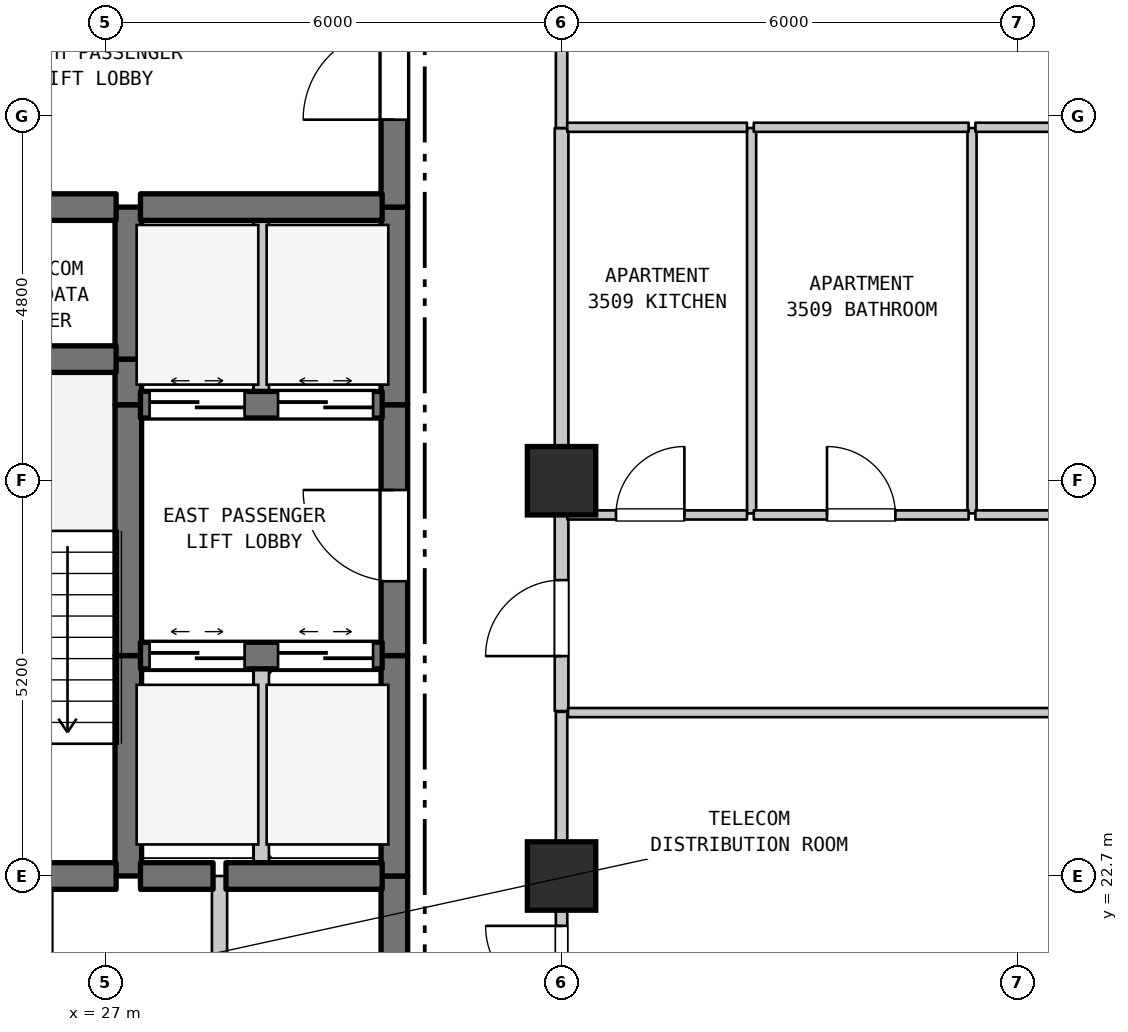
"""IFC4 building model, lengths in metres.
Left out: names, types, materials, properties, quantities, classifications, styles, units other than length and angle.
Written with IfcOpenShell. Run it as: python <this file> out.ifc"""

import sys

from ifc_helpers import new_model, si_unit, direction, frame, frame_2d, origin, origin_2d, place, context, subcontext, project, spatial, rectangle, extrude, element, fill, save


model = new_model("IFC4")
c1 = context("Model", 3, precision=1e-05, world=origin(), true_north=direction((0.0, 1.0)))
c2 = subcontext(c1, "Body", "Model", "MODEL_VIEW")
j1 = project(units=[si_unit("LENGTHUNIT", "METRE"), si_unit("PLANEANGLEUNIT", "RADIAN")], contexts=[c1])
p1 = place(None, origin())
s1 = spatial("IfcSite", under=j1, at=p1, CompositionType="ELEMENT")
p2 = place(p1, origin())
s2 = spatial("IfcBuilding", under=s1, at=p2, CompositionType="ELEMENT")
p3 = place(p2, frame((0.0, 0.0, 144.6)))
s3 = spatial("IfcBuildingStorey", under=s2, at=p3, CompositionType="ELEMENT", Elevation=144.6)
for number, where, z_axis, x_axis in (
    (1, (33.0, 22.7, 0.0), (0.0, 0.0, 1.0), (1.0, 0.0, 0.0)),
    (2, (33.0, 27.9, 0.0), (0.0, 0.0, 1.0), (1.0, 0.0, 0.0)),
):
    element("IfcColumn", number, at=place(p3, frame(where, z_axis=z_axis, x_axis=x_axis)), inside=s3, PredefinedType="COLUMN", context=c2, shape_type="SweptSolid", body=[
        extrude(rectangle(XDim=0.9, YDim=0.9, at=origin_2d()), origin(), (0.0, 0.0, 1.0), 3.7),
    ])
p4 = place(p3, frame((27.3, 22.7, 0.0), z_axis=(0.0, 0.0, 1.0), x_axis=(0.0, 1.0, 0.0)))
e3 = element("IfcWall", 3, at=p4, inside=s3, PredefinedType="SHEAR", context=c2, shape_type="SweptSolid", body=[
    extrude(rectangle(XDim=2.9, YDim=0.35, at=frame_2d((1.45, 0.0))), origin(), (0.0, 0.0, 1.0), 3.385),
])
p5 = place(p3, frame((27.3, 25.6, 0.0), z_axis=(0.0, 0.0, 1.0), x_axis=(0.0, 1.0, 0.0)))
e4 = element("IfcWall", 4, at=p5, inside=s3, PredefinedType="SHEAR", context=c2, shape_type="SweptSolid", body=[
    extrude(rectangle(XDim=3.3, YDim=0.35, at=frame_2d((1.65, 0.0))), origin(), (0.0, 0.0, 1.0), 3.385),
])
p6 = place(p3, frame((27.3, 28.9, 0.0), z_axis=(0.0, 0.0, 1.0), x_axis=(0.0, 1.0, 0.0)))
e5 = element("IfcWall", 5, at=p6, inside=s3, PredefinedType="SHEAR", context=c2, shape_type="SweptSolid", body=[
    extrude(rectangle(XDim=0.6, YDim=0.35, at=frame_2d((0.3, 0.0))), origin(), (0.0, 0.0, 1.0), 3.385),
])
p7 = place(p3, frame((27.3, 29.5, 0.0), z_axis=(0.0, 0.0, 1.0), x_axis=(0.0, 1.0, 0.0)))
e6 = element("IfcWall", 6, at=p7, inside=s3, PredefinedType="SHEAR", context=c2, shape_type="SweptSolid", body=[
    extrude(rectangle(XDim=2.0, YDim=0.35, at=frame_2d((1.0, 0.0))), origin(), (0.0, 0.0, 1.0), 3.385),
])
p8 = place(p3, frame((28.5, 19.5, 0.0), z_axis=(0.0, 0.0, 1.0), x_axis=(0.0, 1.0, 0.0)))
e7 = element("IfcWall", 7, at=p8, inside=s3, PredefinedType="STANDARD", context=c2, shape_type="SweptSolid", body=[
    extrude(rectangle(XDim=3.2, YDim=0.2, at=frame_2d((1.6, 0.0))), origin(), (0.0, 0.0, 1.0), 3.385),
])
p9 = place(p3, frame((29.05, 22.7, 0.0), z_axis=(0.0, 0.0, 1.0), x_axis=(0.0, 1.0, 0.0)))
e8 = element("IfcWall", 8, at=p9, inside=s3, PredefinedType="STANDARD", context=c2, shape_type="SweptSolid", body=[
    extrude(rectangle(XDim=2.9, YDim=0.2, at=frame_2d((1.45, 0.0))), origin(), (0.0, 0.0, 1.0), 3.385),
])
p10 = place(p3, frame((29.05, 28.9, 0.0), z_axis=(0.0, 0.0, 1.0), x_axis=(0.0, 1.0, 0.0)))
e9 = element("IfcWall", 9, at=p10, inside=s3, PredefinedType="STANDARD", context=c2, shape_type="SweptSolid", body=[
    extrude(rectangle(XDim=2.6, YDim=0.2, at=frame_2d((1.3, 0.0))), origin(), (0.0, 0.0, 1.0), 3.385),
])
p11 = place(p3, frame((30.8, 19.5, 0.0), z_axis=(0.0, 0.0, 1.0), x_axis=(0.0, 1.0, 0.0)))
e10 = element("IfcWall", 10, at=p11, inside=s3, PredefinedType="SHEAR", context=c2, shape_type="SweptSolid", body=[
    extrude(rectangle(XDim=3.2, YDim=0.35, at=frame_2d((1.6, 0.0))), origin(), (0.0, 0.0, 1.0), 3.385),
])
p12 = place(p3, frame((30.8, 22.7, 0.0), z_axis=(0.0, 0.0, 1.0), x_axis=(0.0, 1.0, 0.0)))
e11 = element("IfcWall", 11, at=p12, inside=s3, PredefinedType="SHEAR", context=c2, shape_type="SweptSolid", body=[
    extrude(rectangle(XDim=2.9, YDim=0.35, at=frame_2d((1.45, 0.0))), origin(), (0.0, 0.0, 1.0), 3.385),
])
p13 = place(p3, frame((30.8, 25.6, 0.0), z_axis=(0.0, 0.0, 1.0), x_axis=(0.0, 1.0, 0.0)))
e12 = element("IfcWall", 12, at=p13, inside=s3, PredefinedType="SHEAR", context=c2, shape_type="SweptSolid", body=[
    extrude(rectangle(XDim=3.3, YDim=0.35, at=frame_2d((1.65, 0.0))), origin(), (0.0, 0.0, 1.0), 3.385),
])
p14 = place(p13, frame((0.978, 0.0, 0.0)))
e13 = element("IfcOpeningElement", 13, at=p14, cuts=e12, PredefinedType="OPENING", context=c2, shape_type="SweptSolid", body=[
    extrude(rectangle(XDim=1.2, YDim=2.2, at=frame_2d((0.6, 1.1))), frame((0.0, 0.185, 0.0), z_axis=(0.0, -1.0, 0.0), x_axis=(1.0, 0.0, 0.0)), (0.0, 0.0, 1.0), 0.37),
])
p15 = place(p3, frame((30.8, 28.9, 0.0), z_axis=(0.0, 0.0, 1.0), x_axis=(0.0, 1.0, 0.0)))
e14 = element("IfcWall", 14, at=p15, inside=s3, PredefinedType="SHEAR", context=c2, shape_type="SweptSolid", body=[
    extrude(rectangle(XDim=2.6, YDim=0.35, at=frame_2d((1.3, 0.0))), origin(), (0.0, 0.0, 1.0), 3.385),
])
p16 = place(p3, frame((30.8, 31.5, 0.0), z_axis=(0.0, 0.0, 1.0), x_axis=(0.0, 1.0, 0.0)))
e15 = element("IfcWall", 15, at=p16, inside=s3, PredefinedType="SHEAR", context=c2, shape_type="SweptSolid", body=[
    extrude(rectangle(XDim=3.5, YDim=0.35, at=frame_2d((1.75, 0.0))), origin(), (0.0, 0.0, 1.0), 3.385),
])
p17 = place(p16, frame((1.15, 0.0, 0.0)))
e16 = element("IfcOpeningElement", 16, at=p17, cuts=e15, PredefinedType="OPENING", context=c2, shape_type="SweptSolid", body=[
    extrude(rectangle(XDim=1.2, YDim=2.2, at=frame_2d((0.6, 1.1))), frame((0.0, 0.185, 0.0), z_axis=(0.0, -1.0, 0.0), x_axis=(1.0, 0.0, 0.0)), (0.0, 0.0, 1.0), 0.37),
])
p18 = place(p3, frame((33.0, 19.51, 0.0), z_axis=(0.0, 0.0, 1.0), x_axis=(0.0, 1.0, 0.0)))
e17 = element("IfcWall", 17, at=p18, inside=s3, PredefinedType="STANDARD", context=c2, shape_type="SweptSolid", body=[
    extrude(rectangle(XDim=5.35, YDim=0.15, at=frame_2d((2.675, 0.0))), origin(), (0.0, 0.0, 1.0), 2.935),
])
p19 = place(p18, frame((1.534, 0.0, 0.0)))
e18 = element("IfcOpeningElement", 18, at=p19, cuts=e17, PredefinedType="OPENING", context=c2, shape_type="SweptSolid", body=[
    extrude(rectangle(XDim=1.0, YDim=2.15, at=frame_2d((0.5, 1.075))), frame((0.0, 0.085, 0.0), z_axis=(0.0, -1.0, 0.0), x_axis=(1.0, 0.0, 0.0)), (0.0, 0.0, 1.0), 0.17),
])
p20 = place(p3, frame((33.0, 24.87, 0.0), z_axis=(0.0, 0.0, 1.0), x_axis=(0.0, 1.0, 0.0)))
e19 = element("IfcWall", 19, at=p20, inside=s3, PredefinedType="STANDARD", context=c2, shape_type="SweptSolid", body=[
    extrude(rectangle(XDim=2.6, YDim=0.18, at=frame_2d((1.3, 0.0))), origin(), (0.0, 0.0, 1.0), 2.935),
])
p21 = place(p20, frame((0.723, 0.0, 0.0)))
e20 = element("IfcOpeningElement", 20, at=p21, cuts=e19, PredefinedType="OPENING", context=c2, shape_type="SweptSolid", body=[
    extrude(rectangle(XDim=1.0, YDim=2.15, at=frame_2d((0.5, 1.075))), frame((0.0, 0.1, 0.0), z_axis=(0.0, -1.0, 0.0), x_axis=(1.0, 0.0, 0.0)), (0.0, 0.0, 1.0), 0.2),
])
p22 = place(p3, frame((33.0, 27.47, 0.0), z_axis=(0.0, 0.0, 1.0), x_axis=(0.0, 1.0, 0.0)))
e21 = element("IfcWall", 21, at=p22, inside=s3, PredefinedType="STANDARD", context=c2, shape_type="SweptSolid", body=[
    extrude(rectangle(XDim=5.07, YDim=0.18, at=frame_2d((2.535, 0.0))), origin(), (0.0, 0.0, 1.0), 2.885),
])
p23 = place(p3, frame((33.0, 32.54, 0.0), z_axis=(0.0, 0.0, 1.0), x_axis=(0.0, 1.0, 0.0)))
e22 = element("IfcWall", 22, at=p23, inside=s3, PredefinedType="STANDARD", context=c2, shape_type="SweptSolid", body=[
    extrude(rectangle(XDim=5.36, YDim=0.15, at=frame_2d((2.68, 0.0))), origin(), (0.0, 0.0, 1.0), 2.885),
])
p24 = place(p23, frame((2.109, 0.0, 0.0)))
e23 = element("IfcOpeningElement", 23, at=p24, cuts=e22, PredefinedType="OPENING", context=c2, shape_type="SweptSolid", body=[
    extrude(rectangle(XDim=1.0, YDim=2.15, at=frame_2d((0.5, 1.075))), frame((0.0, 0.085, 0.0), z_axis=(0.0, -1.0, 0.0), x_axis=(1.0, 0.0, 0.0)), (0.0, 0.0, 1.0), 0.17),
])
for number, where, z_axis, x_axis in (
    (24, (35.5, 27.47, 0.0), (0.0, 0.0, 1.0), (0.0, 1.0, 0.0)),
    (25, (38.4, 27.47, 0.0), (0.0, 0.0, 1.0), (0.0, 1.0, 0.0)),
):
    element("IfcWall", number, at=place(p3, frame(where, z_axis=z_axis, x_axis=x_axis)), inside=s3, PredefinedType="PARTITIONING", context=c2, shape_type="SweptSolid", body=[
        extrude(rectangle(XDim=5.07, YDim=0.12, at=frame_2d((2.535, 0.0))), origin(), (0.0, 0.0, 1.0), 3.385),
    ])
p25 = place(p3, frame((23.96, 22.7, 0.0), z_axis=(0.0, 0.0, 1.0), x_axis=(1.0, 0.0, 0.0)))
e26 = element("IfcWall", 26, at=p25, inside=s3, PredefinedType="SHEAR", context=c2, shape_type="SweptSolid", body=[
    extrude(rectangle(XDim=3.18, YDim=0.35, at=frame_2d((1.59, 0.0))), origin(), (0.0, 0.0, 1.0), 3.385),
])
p26 = place(p3, frame((27.46, 22.7, 0.0), z_axis=(0.0, 0.0, 1.0), x_axis=(1.0, 0.0, 0.0)))
e27 = element("IfcWall", 27, at=p26, inside=s3, PredefinedType="SHEAR", context=c2, shape_type="SweptSolid", body=[
    extrude(rectangle(XDim=0.955, YDim=0.35, at=frame_2d((0.478, 0.0))), origin(), (0.0, 0.0, 1.0), 3.385),
])
p27 = place(p3, frame((28.585, 22.7, 0.0), z_axis=(0.0, 0.0, 1.0), x_axis=(1.0, 0.0, 0.0)))
e28 = element("IfcWall", 28, at=p27, inside=s3, PredefinedType="SHEAR", context=c2, shape_type="SweptSolid", body=[
    extrude(rectangle(XDim=2.055, YDim=0.35, at=frame_2d((1.027, 0.0))), origin(), (0.0, 0.0, 1.0), 3.385),
])
p28 = place(p3, frame((33.085, 24.85, 0.0), z_axis=(0.0, 0.0, 1.0), x_axis=(1.0, 0.0, 0.0)))
e29 = element("IfcWall", 29, at=p28, inside=s3, PredefinedType="PARTITIONING", context=c2, shape_type="SweptSolid", body=[
    extrude(rectangle(XDim=23.905, YDim=0.12, at=frame_2d((11.953, 0.0))), origin(), (0.0, 0.0, 1.0), 3.385),
])
p29 = place(p3, frame((27.46, 25.6, 0.0), z_axis=(0.0, 0.0, 1.0), x_axis=(1.0, 0.0, 0.0)))
e30 = element("IfcWall", 30, at=p29, inside=s3, PredefinedType="SHEAR", context=c2, shape_type="SweptSolid", body=[
    extrude(rectangle(XDim=3.18, YDim=0.35, at=frame_2d((1.59, 0.0))), origin(), (0.0, 0.0, 1.0), 3.385),
])
p30 = place(p29, frame((0.12, 0.0, 0.0)))
e31 = element("IfcOpeningElement", 31, at=p30, cuts=e30, PredefinedType="OPENING", context=c2, shape_type="SweptSolid", body=[
    extrude(rectangle(XDim=1.25, YDim=2.2, at=frame_2d((0.625, 1.1))), frame((0.0, 0.185, 0.0), z_axis=(0.0, -1.0, 0.0), x_axis=(1.0, 0.0, 0.0)), (0.0, 0.0, 1.0), 0.37),
])
p31 = place(p29, frame((1.81, 0.0, 0.0)))
e32 = element("IfcOpeningElement", 32, at=p31, cuts=e30, PredefinedType="OPENING", context=c2, shape_type="SweptSolid", body=[
    extrude(rectangle(XDim=1.25, YDim=2.2, at=frame_2d((0.625, 1.1))), frame((0.0, 0.185, 0.0), z_axis=(0.0, -1.0, 0.0), x_axis=(1.0, 0.0, 0.0)), (0.0, 0.0, 1.0), 0.37),
])
p32 = place(p3, frame((33.075, 27.45, 0.0), z_axis=(0.0, 0.0, 1.0), x_axis=(1.0, 0.0, 0.0)))
e33 = element("IfcWall", 33, at=p32, inside=s3, PredefinedType="PARTITIONING", context=c2, shape_type="SweptSolid", body=[
    extrude(rectangle(XDim=2.364, YDim=0.12, at=frame_2d((1.182, 0.0))), origin(), (0.0, 0.0, 1.0), 3.385),
])
p33 = place(p32, frame((0.641, 0.0, 0.0)))
e34 = element("IfcOpeningElement", 34, at=p33, cuts=e33, PredefinedType="OPENING", context=c2, shape_type="SweptSolid", body=[
    extrude(rectangle(XDim=0.9, YDim=2.15, at=frame_2d((0.45, 1.075))), frame((0.0, 0.07, 0.0), z_axis=(0.0, -1.0, 0.0), x_axis=(1.0, 0.0, 0.0)), (0.0, 0.0, 1.0), 0.14),
])
p34 = place(p3, frame((35.529, 27.45, 0.0), z_axis=(0.0, 0.0, 1.0), x_axis=(1.0, 0.0, 0.0)))
e35 = element("IfcWall", 35, at=p34, inside=s3, PredefinedType="PARTITIONING", context=c2, shape_type="SweptSolid", body=[
    extrude(rectangle(XDim=2.826, YDim=0.12, at=frame_2d((1.413, 0.0))), origin(), (0.0, 0.0, 1.0), 3.385),
])
p35 = place(p34, frame((0.963, 0.0, 0.0)))
e36 = element("IfcOpeningElement", 36, at=p35, cuts=e35, PredefinedType="OPENING", context=c2, shape_type="SweptSolid", body=[
    extrude(rectangle(XDim=0.9, YDim=2.1, at=frame_2d((0.45, 1.05))), frame((0.0, 0.07, 0.0), z_axis=(0.0, -1.0, 0.0), x_axis=(1.0, 0.0, 0.0)), (0.0, 0.0, 1.0), 0.14),
])
p36 = place(p3, frame((38.445, 27.45, 0.0), z_axis=(0.0, 0.0, 1.0), x_axis=(1.0, 0.0, 0.0)))
e37 = element("IfcWall", 37, at=p36, inside=s3, PredefinedType="PARTITIONING", context=c2, shape_type="SweptSolid", body=[
    extrude(rectangle(XDim=18.545, YDim=0.12, at=frame_2d((9.272, 0.0))), origin(), (0.0, 0.0, 1.0), 3.385),
])
p37 = place(p36, frame((3.042, 0.0, 0.0)))
e38 = element("IfcOpeningElement", 38, at=p37, cuts=e37, PredefinedType="OPENING", context=c2, shape_type="SweptSolid", body=[
    extrude(rectangle(XDim=0.9, YDim=2.15, at=frame_2d((0.45, 1.075))), frame((0.0, 0.07, 0.0), z_axis=(0.0, -1.0, 0.0), x_axis=(1.0, 0.0, 0.0)), (0.0, 0.0, 1.0), 0.14),
])
p38 = place(p36, frame((10.103, 0.0, 0.0)))
e39 = element("IfcOpeningElement", 39, at=p38, cuts=e37, PredefinedType="OPENING", context=c2, shape_type="SweptSolid", body=[
    extrude(rectangle(XDim=0.9, YDim=2.15, at=frame_2d((0.45, 1.075))), frame((0.0, 0.07, 0.0), z_axis=(0.0, -1.0, 0.0), x_axis=(1.0, 0.0, 0.0)), (0.0, 0.0, 1.0), 0.14),
])
p39 = place(p36, frame((15.791, 0.0, 0.0)))
e40 = element("IfcOpeningElement", 40, at=p39, cuts=e37, PredefinedType="OPENING", context=c2, shape_type="SweptSolid", body=[
    extrude(rectangle(XDim=0.9, YDim=2.15, at=frame_2d((0.45, 1.075))), frame((0.0, 0.07, 0.0), z_axis=(0.0, -1.0, 0.0), x_axis=(1.0, 0.0, 0.0)), (0.0, 0.0, 1.0), 0.14),
])
p40 = place(p3, frame((27.46, 28.9, 0.0), z_axis=(0.0, 0.0, 1.0), x_axis=(1.0, 0.0, 0.0)))
e41 = element("IfcWall", 41, at=p40, inside=s3, PredefinedType="SHEAR", context=c2, shape_type="SweptSolid", body=[
    extrude(rectangle(XDim=3.18, YDim=0.35, at=frame_2d((1.59, 0.0))), origin(), (0.0, 0.0, 1.0), 3.385),
])
p41 = place(p40, frame((0.12, 0.0, 0.0)))
e42 = element("IfcOpeningElement", 42, at=p41, cuts=e41, PredefinedType="OPENING", context=c2, shape_type="SweptSolid", body=[
    extrude(rectangle(XDim=1.25, YDim=2.2, at=frame_2d((0.625, 1.1))), frame((0.0, 0.185, 0.0), z_axis=(0.0, -1.0, 0.0), x_axis=(1.0, 0.0, 0.0)), (0.0, 0.0, 1.0), 0.37),
])
p42 = place(p40, frame((1.81, 0.0, 0.0)))
e43 = element("IfcOpeningElement", 43, at=p42, cuts=e41, PredefinedType="OPENING", context=c2, shape_type="SweptSolid", body=[
    extrude(rectangle(XDim=1.25, YDim=2.2, at=frame_2d((0.625, 1.1))), frame((0.0, 0.185, 0.0), z_axis=(0.0, -1.0, 0.0), x_axis=(1.0, 0.0, 0.0)), (0.0, 0.0, 1.0), 0.37),
])
p43 = place(p3, frame((23.96, 29.5, 0.0), z_axis=(0.0, 0.0, 1.0), x_axis=(1.0, 0.0, 0.0)))
e44 = element("IfcWall", 44, at=p43, inside=s3, PredefinedType="SHEAR", context=c2, shape_type="SweptSolid", body=[
    extrude(rectangle(XDim=3.18, YDim=0.35, at=frame_2d((1.59, 0.0))), origin(), (0.0, 0.0, 1.0), 3.385),
])
p44 = place(p3, frame((23.96, 31.5, 0.0), z_axis=(0.0, 0.0, 1.0), x_axis=(1.0, 0.0, 0.0)))
e45 = element("IfcWall", 45, at=p44, inside=s3, PredefinedType="SHEAR", context=c2, shape_type="SweptSolid", body=[
    extrude(rectangle(XDim=3.18, YDim=0.35, at=frame_2d((1.59, 0.0))), origin(), (0.0, 0.0, 1.0), 3.385),
])
p45 = place(p44, frame((1.094, 0.0, 0.0)))
e46 = element("IfcOpeningElement", 46, at=p45, cuts=e45, PredefinedType="OPENING", context=c2, shape_type="SweptSolid", body=[
    extrude(rectangle(XDim=0.85, YDim=2.1, at=frame_2d((0.425, 1.05))), frame((0.0, 0.185, 0.0), z_axis=(0.0, -1.0, 0.0), x_axis=(1.0, 0.0, 0.0)), (0.0, 0.0, 1.0), 0.37),
])
p46 = place(p3, frame((27.46, 31.5, 0.0), z_axis=(0.0, 0.0, 1.0), x_axis=(1.0, 0.0, 0.0)))
e47 = element("IfcWall", 47, at=p46, inside=s3, PredefinedType="SHEAR", context=c2, shape_type="SweptSolid", body=[
    extrude(rectangle(XDim=3.18, YDim=0.35, at=frame_2d((1.59, 0.0))), origin(), (0.0, 0.0, 1.0), 3.385),
])
p47 = place(p3, frame((33.075, 32.55, 0.0), z_axis=(0.0, 0.0, 1.0), x_axis=(1.0, 0.0, 0.0)))
e48 = element("IfcWall", 48, at=p47, inside=s3, PredefinedType="PARTITIONING", context=c2, shape_type="SweptSolid", body=[
    extrude(rectangle(XDim=2.364, YDim=0.12, at=frame_2d((1.182, 0.0))), origin(), (0.0, 0.0, 1.0), 3.385),
])
p48 = place(p3, frame((35.529, 32.55, 0.0), z_axis=(0.0, 0.0, 1.0), x_axis=(1.0, 0.0, 0.0)))
e49 = element("IfcWall", 49, at=p48, inside=s3, PredefinedType="PARTITIONING", context=c2, shape_type="SweptSolid", body=[
    extrude(rectangle(XDim=2.826, YDim=0.12, at=frame_2d((1.413, 0.0))), origin(), (0.0, 0.0, 1.0), 3.385),
])
p49 = place(p3, frame((38.445, 32.55, 0.0), z_axis=(0.0, 0.0, 1.0), x_axis=(1.0, 0.0, 0.0)))
e50 = element("IfcWall", 50, at=p49, inside=s3, PredefinedType="PARTITIONING", context=c2, shape_type="SweptSolid", body=[
    extrude(rectangle(XDim=21.335, YDim=0.12, at=frame_2d((10.667, 0.0))), origin(), (0.0, 0.0, 1.0), 3.385),
])
p50 = place(p14, origin())
e51 = element("IfcDoor", 51, at=p50, inside=s3, OperationType="SINGLE_SWING_RIGHT", PredefinedType="DOOR", context=c2, shape_type="SweptSolid", body=[
    extrude(rectangle(XDim=1.2, YDim=2.2, at=frame_2d((0.6, 1.1))), frame((0.0, 0.025, 0.0), z_axis=(0.0, -1.0, 0.0), x_axis=(1.0, 0.0, 0.0)), (0.0, 0.0, 1.0), 0.05),
])
fill(e13, e51)
p51 = place(p17, origin())
e52 = element("IfcDoor", 52, at=p51, inside=s3, OperationType="SINGLE_SWING_LEFT", PredefinedType="DOOR", context=c2, shape_type="SweptSolid", body=[
    extrude(rectangle(XDim=1.2, YDim=2.2, at=frame_2d((0.6, 1.1))), frame((0.0, 0.025, 0.0), z_axis=(0.0, -1.0, 0.0), x_axis=(1.0, 0.0, 0.0)), (0.0, 0.0, 1.0), 0.05),
])
fill(e16, e52)
p52 = place(p19, origin())
e53 = element("IfcDoor", 53, at=p52, inside=s3, OperationType="SINGLE_SWING_RIGHT", PredefinedType="DOOR", context=c2, shape_type="SweptSolid", body=[
    extrude(rectangle(XDim=1.0, YDim=2.15, at=frame_2d((0.5, 1.075))), frame((0.0, 0.025, 0.0), z_axis=(0.0, -1.0, 0.0), x_axis=(1.0, 0.0, 0.0)), (0.0, 0.0, 1.0), 0.05),
])
fill(e18, e53)
p53 = place(p21, origin())
e54 = element("IfcDoor", 54, at=p53, inside=s3, OperationType="SINGLE_SWING_LEFT", PredefinedType="DOOR", context=c2, shape_type="SweptSolid", body=[
    extrude(rectangle(XDim=1.0, YDim=2.15, at=frame_2d((0.5, 1.075))), frame((0.0, 0.025, 0.0), z_axis=(0.0, -1.0, 0.0), x_axis=(1.0, 0.0, 0.0)), (0.0, 0.0, 1.0), 0.05),
])
fill(e20, e54)
p54 = place(p30, origin())
e55 = element("IfcDoor", 55, at=p54, inside=s3, OperationType="DOUBLE_DOOR_SLIDING", PredefinedType="DOOR", context=c2, shape_type="SweptSolid", body=[
    extrude(rectangle(XDim=1.25, YDim=2.2, at=frame_2d((0.625, 1.1))), frame((0.0, 0.025, 0.0), z_axis=(0.0, -1.0, 0.0), x_axis=(1.0, 0.0, 0.0)), (0.0, 0.0, 1.0), 0.05),
])
fill(e31, e55)
p55 = place(p31, origin())
e56 = element("IfcDoor", 56, at=p55, inside=s3, OperationType="DOUBLE_DOOR_SLIDING", PredefinedType="DOOR", context=c2, shape_type="SweptSolid", body=[
    extrude(rectangle(XDim=1.25, YDim=2.2, at=frame_2d((0.625, 1.1))), frame((0.0, 0.025, 0.0), z_axis=(0.0, -1.0, 0.0), x_axis=(1.0, 0.0, 0.0)), (0.0, 0.0, 1.0), 0.05),
])
fill(e32, e56)
p56 = place(p33, origin())
e57 = element("IfcDoor", 57, at=p56, inside=s3, OperationType="SINGLE_SWING_RIGHT", PredefinedType="DOOR", context=c2, shape_type="SweptSolid", body=[
    extrude(rectangle(XDim=0.9, YDim=2.15, at=frame_2d((0.45, 1.075))), frame((0.0, 0.025, 0.0), z_axis=(0.0, -1.0, 0.0), x_axis=(1.0, 0.0, 0.0)), (0.0, 0.0, 1.0), 0.05),
])
fill(e34, e57)
p57 = place(p35, origin())
e58 = element("IfcDoor", 58, at=p57, inside=s3, OperationType="SINGLE_SWING_LEFT", PredefinedType="DOOR", context=c2, shape_type="SweptSolid", body=[
    extrude(rectangle(XDim=0.9, YDim=2.1, at=frame_2d((0.45, 1.05))), frame((0.0, 0.025, 0.0), z_axis=(0.0, -1.0, 0.0), x_axis=(1.0, 0.0, 0.0)), (0.0, 0.0, 1.0), 0.05),
])
fill(e36, e58)
p58 = place(p41, origin())
e59 = element("IfcDoor", 59, at=p58, inside=s3, OperationType="DOUBLE_DOOR_SLIDING", PredefinedType="DOOR", context=c2, shape_type="SweptSolid", body=[
    extrude(rectangle(XDim=1.25, YDim=2.2, at=frame_2d((0.625, 1.1))), frame((0.0, 0.025, 0.0), z_axis=(0.0, -1.0, 0.0), x_axis=(1.0, 0.0, 0.0)), (0.0, 0.0, 1.0), 0.05),
])
fill(e42, e59)
p59 = place(p42, origin())
e60 = element("IfcDoor", 60, at=p59, inside=s3, OperationType="DOUBLE_DOOR_SLIDING", PredefinedType="DOOR", context=c2, shape_type="SweptSolid", body=[
    extrude(rectangle(XDim=1.25, YDim=2.2, at=frame_2d((0.625, 1.1))), frame((0.0, 0.025, 0.0), z_axis=(0.0, -1.0, 0.0), x_axis=(1.0, 0.0, 0.0)), (0.0, 0.0, 1.0), 0.05),
])
fill(e43, e60)
save(model, sys.argv[1])
